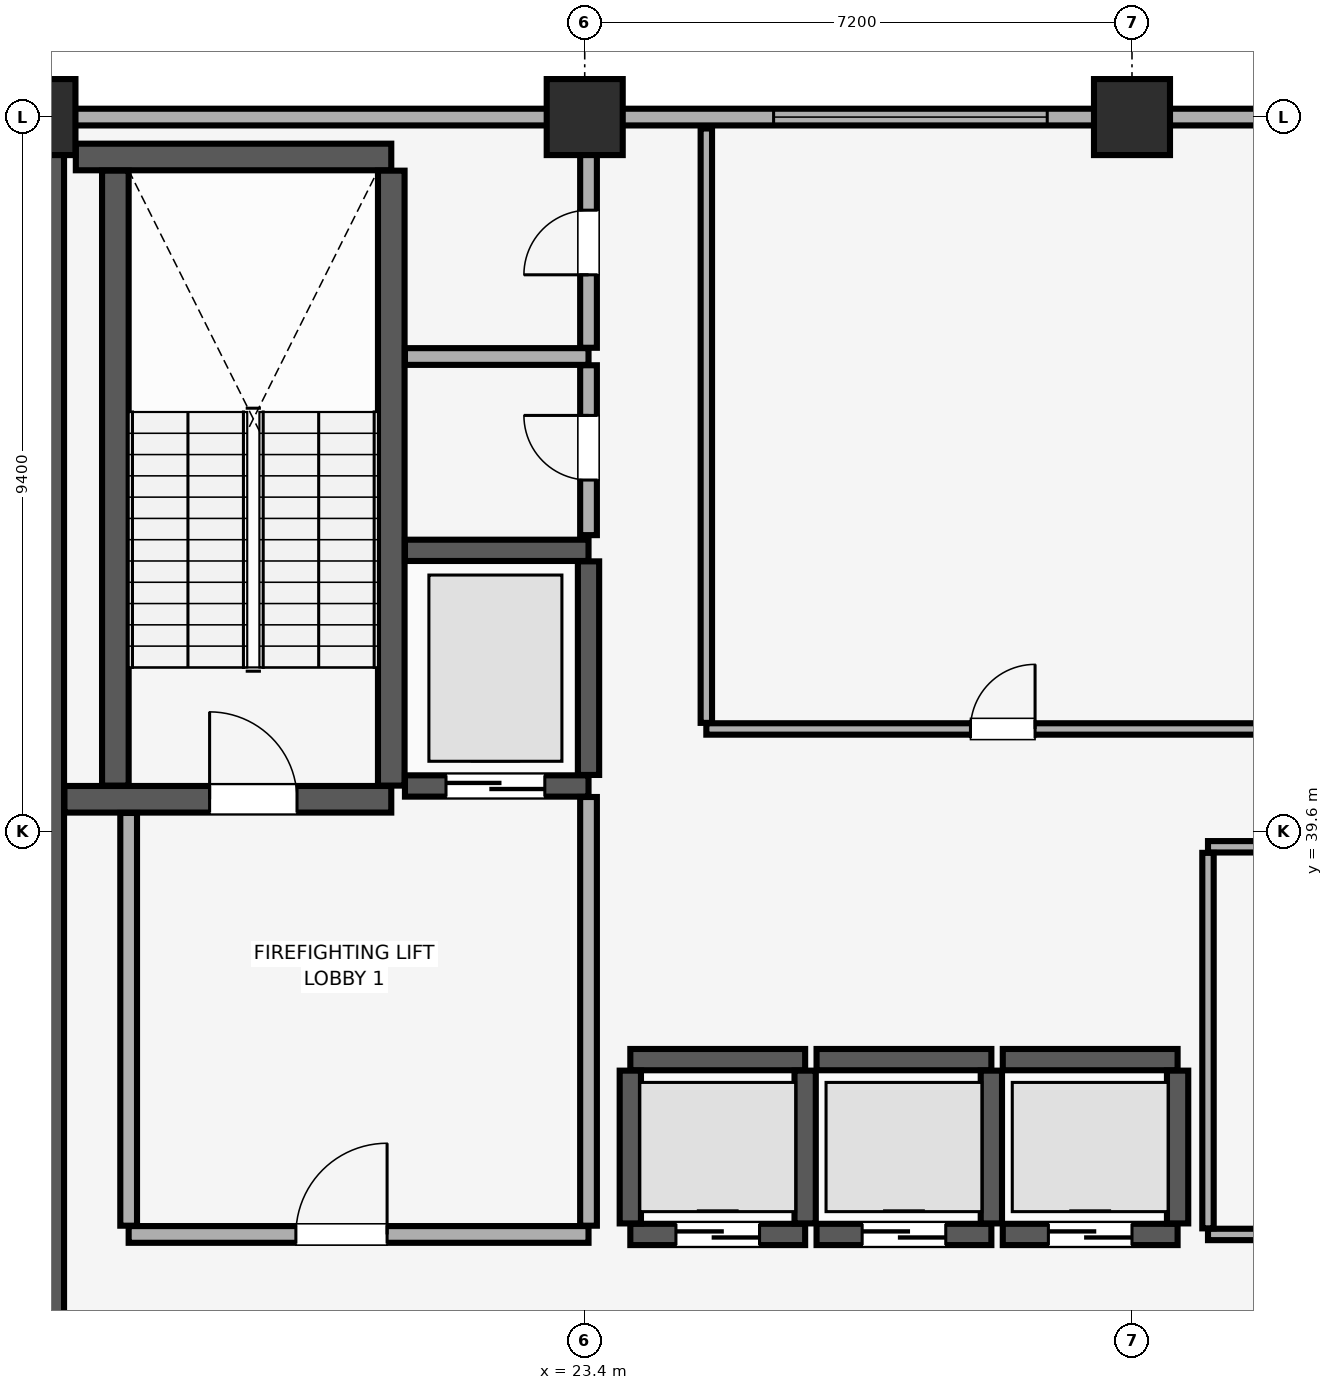
"""IFC4 building model, lengths in metres.
Left out: names, types, materials, properties, quantities, classifications, styles, units other than length and angle.
Written with IfcOpenShell. Run it as: python <this file> out.ifc"""

import sys

from ifc_helpers import new_model, si_unit, direction, frame, frame_2d, origin, origin_2d, place, context, subcontext, project, spatial, rectangle, extrude, element, fill, save


model = new_model("IFC4")
c1 = context("Model", 3, precision=1e-05, world=origin(), true_north=direction((0.0, 1.0)))
c2 = subcontext(c1, "Body", "Model", "MODEL_VIEW")
j1 = project(units=[si_unit("LENGTHUNIT", "METRE"), si_unit("PLANEANGLEUNIT", "RADIAN")], contexts=[c1])
p1 = place(None, origin())
s1 = spatial("IfcSite", under=j1, at=p1, CompositionType="ELEMENT")
p2 = place(p1, origin())
s2 = spatial("IfcBuilding", under=s1, at=p2, CompositionType="ELEMENT")
p3 = place(p2, frame((0.0, 0.0, 290.3)))
s3 = spatial("IfcBuildingStorey", under=s2, at=p3, CompositionType="ELEMENT", Elevation=290.3)
for number, where, z_axis, x_axis in (
    (1, (16.2, 49.0, 0.0), (0.0, 0.0, 1.0), (1.0, 0.0, 0.0)),
    (2, (23.4, 49.0, 0.0), (0.0, 0.0, 1.0), (1.0, 0.0, 0.0)),
    (3, (30.6, 49.0, 0.0), (0.0, 0.0, 1.0), (1.0, 0.0, 0.0)),
):
    element("IfcColumn", number, at=place(p3, frame(where, z_axis=z_axis, x_axis=x_axis)), inside=s3, PredefinedType="COLUMN", context=c2, shape_type="SweptSolid", body=[
        extrude(rectangle(XDim=1.0, YDim=1.0, at=origin_2d()), origin(), (0.0, 0.0, 1.0), 4.02),
    ])
p4 = place(p3, frame((71.4, 49.0, 0.0), z_axis=(0.0, 0.0, 1.0), x_axis=(-1.0, 0.0, 0.0)))
e4 = element("IfcWall", 4, at=p4, inside=s3, PredefinedType="SOLIDWALL", context=c2, shape_type="SweptSolid", body=[
    extrude(rectangle(XDim=58.8, YDim=0.22, at=frame_2d((29.4, 0.0))), origin(), (0.0, 0.0, 1.0), 3.22),
])
p5 = place(p4, frame((56.365, 0.0, 0.85)))
e5 = element("IfcOpeningElement", 5, at=p5, cuts=e4, PredefinedType="OPENING", context=c2, shape_type="SweptSolid", body=[
    extrude(rectangle(XDim=1.5, YDim=1.4, at=frame_2d((0.75, 0.7))), frame((0.0, 0.12, 0.0), z_axis=(0.0, -1.0, 0.0), x_axis=(1.0, 0.0, 0.0)), (0.0, 0.0, 1.0), 0.24),
])
p6 = place(p4, frame((0.935, 0.0, 0.85)))
e6 = element("IfcOpeningElement", 6, at=p6, cuts=e4, PredefinedType="OPENING", context=c2, shape_type="SweptSolid", body=[
    extrude(rectangle(XDim=1.5, YDim=1.4, at=frame_2d((0.75, 0.7))), frame((0.0, 0.12, 0.0), z_axis=(0.0, -1.0, 0.0), x_axis=(1.0, 0.0, 0.0)), (0.0, 0.0, 1.0), 0.24),
])
p7 = place(p4, frame((41.915, 0.0, 0.9)))
e7 = element("IfcOpeningElement", 7, at=p7, cuts=e4, PredefinedType="OPENING", context=c2, shape_type="SweptSolid", body=[
    extrude(rectangle(XDim=3.6, YDim=1.5, at=frame_2d((1.8, 0.75))), frame((0.0, 0.12, 0.0), z_axis=(0.0, -1.0, 0.0), x_axis=(1.0, 0.0, 0.0)), (0.0, 0.0, 1.0), 0.24),
])
p8 = place(p4, frame((35.7, 0.0, 0.9)))
e8 = element("IfcOpeningElement", 8, at=p8, cuts=e4, PredefinedType="OPENING", context=c2, shape_type="SweptSolid", body=[
    extrude(rectangle(XDim=2.4, YDim=1.5, at=frame_2d((1.2, 0.75))), frame((0.0, 0.12, 0.0), z_axis=(0.0, -1.0, 0.0), x_axis=(1.0, 0.0, 0.0)), (0.0, 0.0, 1.0), 0.24),
])
p9 = place(p4, frame((18.95, 0.0, 0.9)))
e9 = element("IfcOpeningElement", 9, at=p9, cuts=e4, PredefinedType="OPENING", context=c2, shape_type="SweptSolid", body=[
    extrude(rectangle(XDim=3.0, YDim=1.5, at=frame_2d((1.5, 0.75))), frame((0.0, 0.12, 0.0), z_axis=(0.0, -1.0, 0.0), x_axis=(1.0, 0.0, 0.0)), (0.0, 0.0, 1.0), 0.24),
])
p10 = place(p4, frame((14.635, 0.0, 0.9)))
e10 = element("IfcOpeningElement", 10, at=p10, cuts=e4, PredefinedType="OPENING", context=c2, shape_type="SweptSolid", body=[
    extrude(rectangle(XDim=2.4, YDim=1.5, at=frame_2d((1.2, 0.75))), frame((0.0, 0.12, 0.0), z_axis=(0.0, -1.0, 0.0), x_axis=(1.0, 0.0, 0.0)), (0.0, 0.0, 1.0), 0.24),
])
p11 = place(p3, frame((16.2, 29.4, 0.0), z_axis=(0.0, 0.0, 1.0), x_axis=(0.0, 1.0, 0.0)))
e11 = element("IfcWall", 11, at=p11, inside=s3, PredefinedType="SHEAR", context=c2, shape_type="SweptSolid", body=[
    extrude(rectangle(XDim=19.2, YDim=0.7, at=frame_2d((9.6, 0.0))), origin(), (0.0, 0.0, 1.0), 4.02),
])
p12 = place(p3, frame((16.555, 40.025, 0.0), z_axis=(0.0, 0.0, 1.0), x_axis=(1.0, 0.0, 0.0)))
e12 = element("IfcWall", 12, at=p12, inside=s3, PredefinedType="SHEAR", context=c2, shape_type="SweptSolid", body=[
    extrude(rectangle(XDim=4.3, YDim=0.35, at=frame_2d((2.15, 0.0))), origin(), (0.0, 0.0, 1.0), 4.02),
])
p13 = place(p12, frame((1.91, 0.0, 0.0)))
e13 = element("IfcOpeningElement", 13, at=p13, cuts=e12, PredefinedType="OPENING", context=c2, shape_type="SweptSolid", body=[
    extrude(rectangle(XDim=1.15, YDim=2.15, at=frame_2d((0.575, 1.075))), frame((0.0, 0.185, 0.0), z_axis=(0.0, -1.0, 0.0), x_axis=(1.0, 0.0, 0.0)), (0.0, 0.0, 1.0), 0.37),
])
p14 = place(p3, frame((16.705, 48.475, 0.0), z_axis=(0.0, 0.0, 1.0), x_axis=(1.0, 0.0, 0.0)))
e14 = element("IfcWall", 14, at=p14, inside=s3, PredefinedType="SHEAR", context=c2, shape_type="SweptSolid", body=[
    extrude(rectangle(XDim=4.15, YDim=0.35, at=frame_2d((2.075, 0.0))), origin(), (0.0, 0.0, 1.0), 4.02),
])
for number, where, z_axis, x_axis in (
    (15, (17.225, 40.205, 0.0), (0.0, 0.0, 1.0), (0.0, 1.0, 0.0)),
    (16, (20.855, 40.205, 0.0), (0.0, 0.0, 1.0), (0.0, 1.0, 0.0)),
):
    element("IfcWall", number, at=place(p3, frame(where, z_axis=z_axis, x_axis=x_axis)), inside=s3, PredefinedType="SHEAR", context=c2, shape_type="SweptSolid", body=[
        extrude(rectangle(XDim=8.09, YDim=0.35, at=frame_2d((4.045, 0.0))), origin(), (0.0, 0.0, 1.0), 4.02),
    ])
p15 = place(p3, frame((24.0, 34.3, 0.0), z_axis=(0.0, 0.0, 1.0), x_axis=(1.0, 0.0, 0.0)))
e17 = element("IfcWall", 17, at=p15, inside=s3, PredefinedType="SHEAR", context=c2, shape_type="SweptSolid", body=[
    extrude(rectangle(XDim=2.3, YDim=0.28, at=frame_2d((1.15, 0.0))), origin(), (0.0, 0.0, 1.0), 4.02),
])
p16 = place(p15, frame((0.6, 0.0, 0.0)))
e18 = element("IfcOpeningElement", 18, at=p16, cuts=e17, PredefinedType="OPENING", context=c2, shape_type="SweptSolid", body=[
    extrude(rectangle(XDim=1.1, YDim=2.2, at=frame_2d((0.55, 1.1))), frame((0.0, 0.15, 0.0), z_axis=(0.0, -1.0, 0.0), x_axis=(1.0, 0.0, 0.0)), (0.0, 0.0, 1.0), 0.3),
])
p17 = place(p3, frame((24.0, 36.6, 0.0), z_axis=(0.0, 0.0, 1.0), x_axis=(1.0, 0.0, 0.0)))
e19 = element("IfcWall", 19, at=p17, inside=s3, PredefinedType="SHEAR", context=c2, shape_type="SweptSolid", body=[
    extrude(rectangle(XDim=2.3, YDim=0.28, at=frame_2d((1.15, 0.0))), origin(), (0.0, 0.0, 1.0), 4.02),
])
for number, where, z_axis, x_axis in (
    (20, (24.0, 34.445, 0.0), (0.0, 0.0, 1.0), (0.0, 1.0, 0.0)),
    (21, (26.3, 34.445, 0.0), (0.0, 0.0, 1.0), (0.0, 1.0, 0.0)),
):
    element("IfcWall", number, at=place(p3, frame(where, z_axis=z_axis, x_axis=x_axis)), inside=s3, PredefinedType="SHEAR", context=c2, shape_type="SweptSolid", body=[
        extrude(rectangle(XDim=2.01, YDim=0.28, at=frame_2d((1.005, 0.0))), origin(), (0.0, 0.0, 1.0), 4.02),
    ])
p18 = place(p3, frame((26.45, 34.3, 0.0), z_axis=(0.0, 0.0, 1.0), x_axis=(1.0, 0.0, 0.0)))
e22 = element("IfcWall", 22, at=p18, inside=s3, PredefinedType="SHEAR", context=c2, shape_type="SweptSolid", body=[
    extrude(rectangle(XDim=2.3, YDim=0.28, at=frame_2d((1.15, 0.0))), origin(), (0.0, 0.0, 1.0), 4.02),
])
p19 = place(p18, frame((0.6, 0.0, 0.0)))
e23 = element("IfcOpeningElement", 23, at=p19, cuts=e22, PredefinedType="OPENING", context=c2, shape_type="SweptSolid", body=[
    extrude(rectangle(XDim=1.1, YDim=2.2, at=frame_2d((0.55, 1.1))), frame((0.0, 0.15, 0.0), z_axis=(0.0, -1.0, 0.0), x_axis=(1.0, 0.0, 0.0)), (0.0, 0.0, 1.0), 0.3),
])
p20 = place(p3, frame((26.45, 36.6, 0.0), z_axis=(0.0, 0.0, 1.0), x_axis=(1.0, 0.0, 0.0)))
e24 = element("IfcWall", 24, at=p20, inside=s3, PredefinedType="SHEAR", context=c2, shape_type="SweptSolid", body=[
    extrude(rectangle(XDim=2.3, YDim=0.28, at=frame_2d((1.15, 0.0))), origin(), (0.0, 0.0, 1.0), 4.02),
])
p21 = place(p3, frame((28.75, 34.445, 0.0), z_axis=(0.0, 0.0, 1.0), x_axis=(0.0, 1.0, 0.0)))
e25 = element("IfcWall", 25, at=p21, inside=s3, PredefinedType="SHEAR", context=c2, shape_type="SweptSolid", body=[
    extrude(rectangle(XDim=2.01, YDim=0.28, at=frame_2d((1.005, 0.0))), origin(), (0.0, 0.0, 1.0), 4.02),
])
p22 = place(p3, frame((28.9, 34.3, 0.0), z_axis=(0.0, 0.0, 1.0), x_axis=(1.0, 0.0, 0.0)))
e26 = element("IfcWall", 26, at=p22, inside=s3, PredefinedType="SHEAR", context=c2, shape_type="SweptSolid", body=[
    extrude(rectangle(XDim=2.3, YDim=0.28, at=frame_2d((1.15, 0.0))), origin(), (0.0, 0.0, 1.0), 4.02),
])
p23 = place(p22, frame((0.6, 0.0, 0.0)))
e27 = element("IfcOpeningElement", 27, at=p23, cuts=e26, PredefinedType="OPENING", context=c2, shape_type="SweptSolid", body=[
    extrude(rectangle(XDim=1.1, YDim=2.2, at=frame_2d((0.55, 1.1))), frame((0.0, 0.15, 0.0), z_axis=(0.0, -1.0, 0.0), x_axis=(1.0, 0.0, 0.0)), (0.0, 0.0, 1.0), 0.3),
])
p24 = place(p3, frame((28.9, 36.6, 0.0), z_axis=(0.0, 0.0, 1.0), x_axis=(1.0, 0.0, 0.0)))
e28 = element("IfcWall", 28, at=p24, inside=s3, PredefinedType="SHEAR", context=c2, shape_type="SweptSolid", body=[
    extrude(rectangle(XDim=2.3, YDim=0.28, at=frame_2d((1.15, 0.0))), origin(), (0.0, 0.0, 1.0), 4.02),
])
p25 = place(p3, frame((31.2, 34.445, 0.0), z_axis=(0.0, 0.0, 1.0), x_axis=(0.0, 1.0, 0.0)))
e29 = element("IfcWall", 29, at=p25, inside=s3, PredefinedType="SHEAR", context=c2, shape_type="SweptSolid", body=[
    extrude(rectangle(XDim=2.01, YDim=0.28, at=frame_2d((1.005, 0.0))), origin(), (0.0, 0.0, 1.0), 4.02),
])
p26 = place(p3, frame((21.035, 40.2, 0.0), z_axis=(0.0, 0.0, 1.0), x_axis=(1.0, 0.0, 0.0)))
e30 = element("IfcWall", 30, at=p26, inside=s3, PredefinedType="SHEAR", context=c2, shape_type="SweptSolid", body=[
    extrude(rectangle(XDim=2.415, YDim=0.28, at=frame_2d((1.208, 0.0))), origin(), (0.0, 0.0, 1.0), 4.02),
])
p27 = place(p26, frame((0.54, 0.0, 0.0)))
e31 = element("IfcOpeningElement", 31, at=p27, cuts=e30, PredefinedType="OPENING", context=c2, shape_type="SweptSolid", body=[
    extrude(rectangle(XDim=1.3, YDim=2.3, at=frame_2d((0.65, 1.15))), frame((0.0, 0.15, 0.0), z_axis=(0.0, -1.0, 0.0), x_axis=(1.0, 0.0, 0.0)), (0.0, 0.0, 1.0), 0.3),
])
p28 = place(p3, frame((21.035, 43.3, 0.0), z_axis=(0.0, 0.0, 1.0), x_axis=(1.0, 0.0, 0.0)))
e32 = element("IfcWall", 32, at=p28, inside=s3, PredefinedType="SHEAR", context=c2, shape_type="SweptSolid", body=[
    extrude(rectangle(XDim=2.415, YDim=0.28, at=frame_2d((1.208, 0.0))), origin(), (0.0, 0.0, 1.0), 4.02),
])
p29 = place(p3, frame((23.45, 40.345, 0.0), z_axis=(0.0, 0.0, 1.0), x_axis=(0.0, 1.0, 0.0)))
e33 = element("IfcWall", 33, at=p29, inside=s3, PredefinedType="SHEAR", context=c2, shape_type="SweptSolid", body=[
    extrude(rectangle(XDim=2.81, YDim=0.28, at=frame_2d((1.405, 0.0))), origin(), (0.0, 0.0, 1.0), 4.02),
])
p30 = place(p3, frame((17.4, 34.3, 0.0), z_axis=(0.0, 0.0, 1.0), x_axis=(1.0, 0.0, 0.0)))
e34 = element("IfcWall", 34, at=p30, inside=s3, PredefinedType="PARTITIONING", context=c2, shape_type="SweptSolid", body=[
    extrude(rectangle(XDim=6.05, YDim=0.22, at=frame_2d((3.025, 0.0))), origin(), (0.0, 0.0, 1.0), 4.02),
])
p31 = place(p30, frame((2.2, 0.0, 0.0)))
e35 = element("IfcOpeningElement", 35, at=p31, cuts=e34, PredefinedType="OPENING", context=c2, shape_type="SweptSolid", body=[
    extrude(rectangle(XDim=1.2, YDim=2.15, at=frame_2d((0.6, 1.075))), frame((0.0, 0.12, 0.0), z_axis=(0.0, -1.0, 0.0), x_axis=(1.0, 0.0, 0.0)), (0.0, 0.0, 1.0), 0.24),
])
p32 = place(p3, frame((17.4, 34.415, 0.0), z_axis=(0.0, 0.0, 1.0), x_axis=(0.0, 1.0, 0.0)))
e36 = element("IfcWall", 36, at=p32, inside=s3, PredefinedType="PARTITIONING", context=c2, shape_type="SweptSolid", body=[
    extrude(rectangle(XDim=5.43, YDim=0.22, at=frame_2d((2.715, 0.0))), origin(), (0.0, 0.0, 1.0), 4.02),
])
p33 = place(p3, frame((23.45, 34.415, 0.0), z_axis=(0.0, 0.0, 1.0), x_axis=(0.0, 1.0, 0.0)))
e37 = element("IfcWall", 37, at=p33, inside=s3, PredefinedType="PARTITIONING", context=c2, shape_type="SweptSolid", body=[
    extrude(rectangle(XDim=5.64, YDim=0.22, at=frame_2d((2.82, 0.0))), origin(), (0.0, 0.0, 1.0), 4.02),
])
p34 = place(p3, frame((21.035, 45.85, 0.0), z_axis=(0.0, 0.0, 1.0), x_axis=(1.0, 0.0, 0.0)))
e38 = element("IfcWall", 38, at=p34, inside=s3, PredefinedType="PARTITIONING", context=c2, shape_type="SweptSolid", body=[
    extrude(rectangle(XDim=2.415, YDim=0.22, at=frame_2d((1.208, 0.0))), origin(), (0.0, 0.0, 1.0), 4.02),
])
p35 = place(p3, frame((23.45, 43.5, 0.0), z_axis=(0.0, 0.0, 1.0), x_axis=(0.0, 1.0, 0.0)))
e39 = element("IfcWall", 39, at=p35, inside=s3, PredefinedType="PARTITIONING", context=c2, shape_type="SweptSolid", body=[
    extrude(rectangle(XDim=2.235, YDim=0.22, at=frame_2d((1.118, 0.0))), origin(), (0.0, 0.0, 1.0), 4.02),
])
p36 = place(p35, frame((0.725, 0.0, 0.0)))
e40 = element("IfcOpeningElement", 40, at=p36, cuts=e39, PredefinedType="OPENING", context=c2, shape_type="SweptSolid", body=[
    extrude(rectangle(XDim=0.85, YDim=2.1, at=frame_2d((0.425, 1.05))), frame((0.0, 0.12, 0.0), z_axis=(0.0, -1.0, 0.0), x_axis=(1.0, 0.0, 0.0)), (0.0, 0.0, 1.0), 0.24),
])
p37 = place(p3, frame((23.45, 45.965, 0.0), z_axis=(0.0, 0.0, 1.0), x_axis=(0.0, 1.0, 0.0)))
e41 = element("IfcWall", 41, at=p37, inside=s3, PredefinedType="PARTITIONING", context=c2, shape_type="SweptSolid", body=[
    extrude(rectangle(XDim=2.885, YDim=0.22, at=frame_2d((1.442, 0.0))), origin(), (0.0, 0.0, 1.0), 4.02),
])
p38 = place(p37, frame((0.96, 0.0, 0.0)))
e42 = element("IfcOpeningElement", 42, at=p38, cuts=e41, PredefinedType="OPENING", context=c2, shape_type="SweptSolid", body=[
    extrude(rectangle(XDim=0.85, YDim=2.1, at=frame_2d((0.425, 1.05))), frame((0.0, 0.12, 0.0), z_axis=(0.0, -1.0, 0.0), x_axis=(1.0, 0.0, 0.0)), (0.0, 0.0, 1.0), 0.24),
])
p39 = place(p3, frame((31.6, 34.3, 0.0), z_axis=(0.0, 0.0, 1.0), x_axis=(1.0, 0.0, 0.0)))
e43 = element("IfcWall", 43, at=p39, inside=s3, PredefinedType="PARTITIONING", context=c2, shape_type="SweptSolid", body=[
    extrude(rectangle(XDim=5.2, YDim=0.15, at=frame_2d((2.6, 0.0))), origin(), (0.0, 0.0, 1.0), 4.02),
])
p40 = place(p39, frame((2.175, 0.0, 0.0)))
e44 = element("IfcOpeningElement", 44, at=p40, cuts=e43, PredefinedType="OPENING", context=c2, shape_type="SweptSolid", body=[
    extrude(rectangle(XDim=0.85, YDim=2.1, at=frame_2d((0.425, 1.05))), frame((0.0, 0.085, 0.0), z_axis=(0.0, -1.0, 0.0), x_axis=(1.0, 0.0, 0.0)), (0.0, 0.0, 1.0), 0.17),
])
p41 = place(p3, frame((31.6, 39.4, 0.0), z_axis=(0.0, 0.0, 1.0), x_axis=(1.0, 0.0, 0.0)))
e45 = element("IfcWall", 45, at=p41, inside=s3, PredefinedType="PARTITIONING", context=c2, shape_type="SweptSolid", body=[
    extrude(rectangle(XDim=5.2, YDim=0.15, at=frame_2d((2.6, 0.0))), origin(), (0.0, 0.0, 1.0), 4.02),
])
p42 = place(p3, frame((31.6, 34.38, 0.0), z_axis=(0.0, 0.0, 1.0), x_axis=(0.0, 1.0, 0.0)))
e46 = element("IfcWall", 46, at=p42, inside=s3, PredefinedType="PARTITIONING", context=c2, shape_type="SweptSolid", body=[
    extrude(rectangle(XDim=4.94, YDim=0.15, at=frame_2d((2.47, 0.0))), origin(), (0.0, 0.0, 1.0), 4.02),
])
p43 = place(p3, frame((25.0, 40.95, 0.0), z_axis=(0.0, 0.0, 1.0), x_axis=(1.0, 0.0, 0.0)))
e47 = element("IfcWall", 47, at=p43, inside=s3, PredefinedType="PARTITIONING", context=c2, shape_type="SweptSolid", body=[
    extrude(rectangle(XDim=7.8, YDim=0.15, at=frame_2d((3.9, 0.0))), origin(), (0.0, 0.0, 1.0), 4.02),
])
p44 = place(p43, frame((3.475, 0.0, 0.0)))
e48 = element("IfcOpeningElement", 48, at=p44, cuts=e47, PredefinedType="OPENING", context=c2, shape_type="SweptSolid", body=[
    extrude(rectangle(XDim=0.85, YDim=2.1, at=frame_2d((0.425, 1.05))), frame((0.0, 0.085, 0.0), z_axis=(0.0, -1.0, 0.0), x_axis=(1.0, 0.0, 0.0)), (0.0, 0.0, 1.0), 0.17),
])
p45 = place(p3, frame((25.0, 41.03, 0.0), z_axis=(0.0, 0.0, 1.0), x_axis=(0.0, 1.0, 0.0)))
e49 = element("IfcWall", 49, at=p45, inside=s3, PredefinedType="PARTITIONING", context=c2, shape_type="SweptSolid", body=[
    extrude(rectangle(XDim=7.82, YDim=0.15, at=frame_2d((3.91, 0.0))), origin(), (0.0, 0.0, 1.0), 4.02),
])
p46 = place(p7, origin())
e50 = element("IfcWindow", 50, at=p46, inside=s3, PartitioningType="SINGLE_PANEL", PredefinedType="WINDOW", context=c2, shape_type="SweptSolid", body=[
    extrude(rectangle(XDim=3.6, YDim=1.5, at=frame_2d((1.8, 0.75))), frame((0.0, 0.03, 0.0), z_axis=(0.0, -1.0, 0.0), x_axis=(1.0, 0.0, 0.0)), (0.0, 0.0, 1.0), 0.06),
])
fill(e7, e50)
p47 = place(p13, origin())
e51 = element("IfcDoor", 51, at=p47, inside=s3, OperationType="SINGLE_SWING_LEFT", PredefinedType="DOOR", context=c2, shape_type="SweptSolid", body=[
    extrude(rectangle(XDim=1.15, YDim=2.15, at=frame_2d((0.575, 1.075))), frame((0.0, 0.025, 0.0), z_axis=(0.0, -1.0, 0.0), x_axis=(1.0, 0.0, 0.0)), (0.0, 0.0, 1.0), 0.05),
])
fill(e13, e51)
p48 = place(p16, origin())
e52 = element("IfcDoor", 52, at=p48, inside=s3, OperationType="DOUBLE_DOOR_SLIDING", PredefinedType="DOOR", context=c2, shape_type="SweptSolid", body=[
    extrude(rectangle(XDim=1.1, YDim=2.2, at=frame_2d((0.55, 1.1))), frame((0.0, 0.025, 0.0), z_axis=(0.0, -1.0, 0.0), x_axis=(1.0, 0.0, 0.0)), (0.0, 0.0, 1.0), 0.05),
])
fill(e18, e52)
p49 = place(p19, origin())
e53 = element("IfcDoor", 53, at=p49, inside=s3, OperationType="DOUBLE_DOOR_SLIDING", PredefinedType="DOOR", context=c2, shape_type="SweptSolid", body=[
    extrude(rectangle(XDim=1.1, YDim=2.2, at=frame_2d((0.55, 1.1))), frame((0.0, 0.025, 0.0), z_axis=(0.0, -1.0, 0.0), x_axis=(1.0, 0.0, 0.0)), (0.0, 0.0, 1.0), 0.05),
])
fill(e23, e53)
p50 = place(p23, origin())
e54 = element("IfcDoor", 54, at=p50, inside=s3, OperationType="DOUBLE_DOOR_SLIDING", PredefinedType="DOOR", context=c2, shape_type="SweptSolid", body=[
    extrude(rectangle(XDim=1.1, YDim=2.2, at=frame_2d((0.55, 1.1))), frame((0.0, 0.025, 0.0), z_axis=(0.0, -1.0, 0.0), x_axis=(1.0, 0.0, 0.0)), (0.0, 0.0, 1.0), 0.05),
])
fill(e27, e54)
p51 = place(p27, origin())
e55 = element("IfcDoor", 55, at=p51, inside=s3, OperationType="DOUBLE_DOOR_SLIDING", PredefinedType="DOOR", context=c2, shape_type="SweptSolid", body=[
    extrude(rectangle(XDim=1.3, YDim=2.3, at=frame_2d((0.65, 1.15))), frame((0.0, 0.025, 0.0), z_axis=(0.0, -1.0, 0.0), x_axis=(1.0, 0.0, 0.0)), (0.0, 0.0, 1.0), 0.05),
])
fill(e31, e55)
p52 = place(p31, origin())
e56 = element("IfcDoor", 56, at=p52, inside=s3, OperationType="SINGLE_SWING_RIGHT", PredefinedType="DOOR", context=c2, shape_type="SweptSolid", body=[
    extrude(rectangle(XDim=1.2, YDim=2.15, at=frame_2d((0.6, 1.075))), frame((0.0, 0.025, 0.0), z_axis=(0.0, -1.0, 0.0), x_axis=(1.0, 0.0, 0.0)), (0.0, 0.0, 1.0), 0.05),
])
fill(e35, e56)
p53 = place(p36, origin())
e57 = element("IfcDoor", 57, at=p53, inside=s3, OperationType="SINGLE_SWING_RIGHT", PredefinedType="DOOR", context=c2, shape_type="SweptSolid", body=[
    extrude(rectangle(XDim=0.85, YDim=2.1, at=frame_2d((0.425, 1.05))), frame((0.0, 0.025, 0.0), z_axis=(0.0, -1.0, 0.0), x_axis=(1.0, 0.0, 0.0)), (0.0, 0.0, 1.0), 0.05),
])
fill(e40, e57)
p54 = place(p38, origin())
e58 = element("IfcDoor", 58, at=p54, inside=s3, OperationType="SINGLE_SWING_LEFT", PredefinedType="DOOR", context=c2, shape_type="SweptSolid", body=[
    extrude(rectangle(XDim=0.85, YDim=2.1, at=frame_2d((0.425, 1.05))), frame((0.0, 0.025, 0.0), z_axis=(0.0, -1.0, 0.0), x_axis=(1.0, 0.0, 0.0)), (0.0, 0.0, 1.0), 0.05),
])
fill(e42, e58)
p55 = place(p44, origin())
e59 = element("IfcDoor", 59, at=p55, inside=s3, OperationType="SINGLE_SWING_RIGHT", PredefinedType="DOOR", context=c2, shape_type="SweptSolid", body=[
    extrude(rectangle(XDim=0.85, YDim=2.1, at=frame_2d((0.425, 1.05))), frame((0.0, 0.025, 0.0), z_axis=(0.0, -1.0, 0.0), x_axis=(1.0, 0.0, 0.0)), (0.0, 0.0, 1.0), 0.05),
])
fill(e48, e59)
save(model, sys.argv[1])
